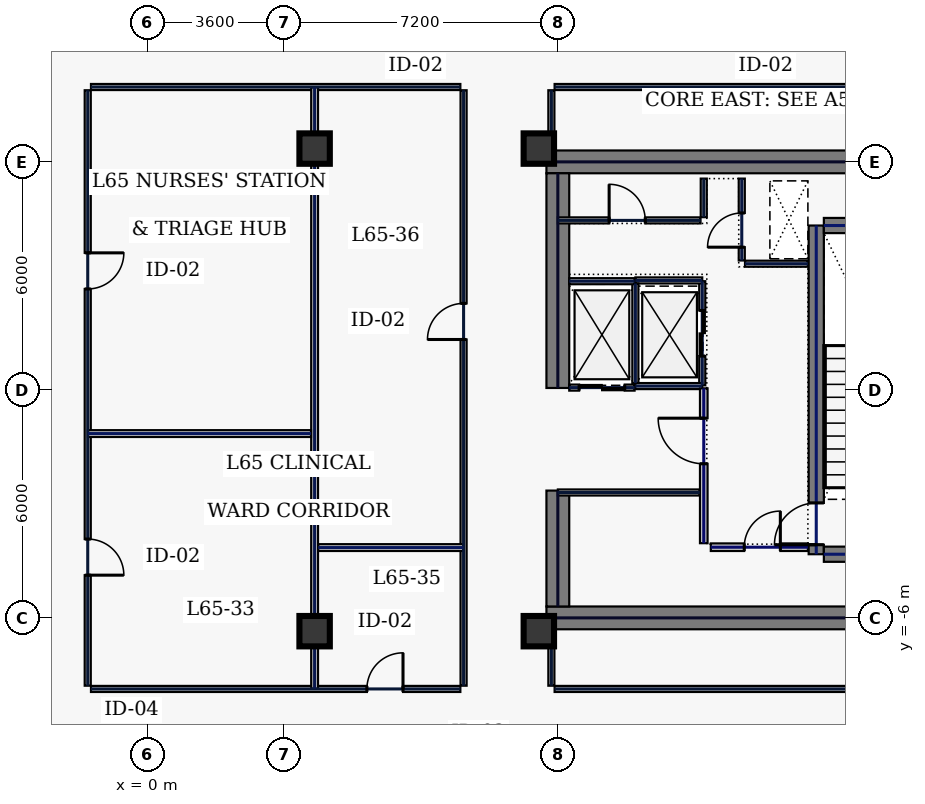
"""IFC4 building model, lengths in metres.
Left out: names, types, materials, properties, quantities, classifications, styles, units other than length and angle.
Written with IfcOpenShell. Run it as: python <this file> out.ifc"""

import sys

from ifc_helpers import new_model, si_unit, direction, frame, frame_2d, origin, origin_2d, place, context, subcontext, project, spatial, rectangle, hollow_rectangle, extrude, element, fill, save


model = new_model("IFC4")
c1 = context("Model", 3, precision=1e-05, world=origin(), true_north=direction((0.0, 1.0)))
c2 = subcontext(c1, "Body", "Model", "MODEL_VIEW")
j1 = project(units=[si_unit("LENGTHUNIT", "METRE"), si_unit("PLANEANGLEUNIT", "RADIAN")], contexts=[c1])
p1 = place(None, origin())
s1 = spatial("IfcSite", under=j1, at=p1, CompositionType="ELEMENT")
p2 = place(p1, origin())
s2 = spatial("IfcBuilding", under=s1, at=p2, CompositionType="ELEMENT")
p3 = place(p2, frame((0.0, 0.0, 281.0)))
s3 = spatial("IfcBuildingStorey", under=s2, at=p3, CompositionType="ELEMENT", Elevation=281.0)
for number, where, z_axis, x_axis in (
    (1, (10.5, 6.0, 0.0), (0.0, 0.0, 1.0), (1.0, 0.0, 0.0)),
    (2, (10.5, -6.0, 0.0), (0.0, 0.0, 1.0), (1.0, 0.0, 0.0)),
):
    element("IfcWall", number, at=place(p3, frame(where, z_axis=z_axis, x_axis=x_axis)), inside=s3, PredefinedType="SHEAR", context=c2, shape_type="SweptSolid", body=[
        extrude(rectangle(XDim=11.5, YDim=0.6, at=frame_2d((5.75, 0.0))), origin(), (0.0, 0.0, 1.0), 3.74),
    ])
p4 = place(p3, frame((10.8, -5.7, 0.0), z_axis=(0.0, 0.0, 1.0), x_axis=(0.0, 1.0, 0.0)))
e3 = element("IfcWall", 3, at=p4, inside=s3, PredefinedType="SHEAR", context=c2, shape_type="SweptSolid", body=[
    extrude(rectangle(XDim=3.05, YDim=0.6, at=frame_2d((1.525, 0.0))), origin(), (0.0, 0.0, 1.0), 3.74),
])
p5 = place(p3, frame((10.8, 0.05, 0.0), z_axis=(0.0, 0.0, 1.0), x_axis=(0.0, 1.0, 0.0)))
e4 = element("IfcWall", 4, at=p5, inside=s3, PredefinedType="SHEAR", context=c2, shape_type="SweptSolid", body=[
    extrude(rectangle(XDim=5.65, YDim=0.6, at=frame_2d((2.825, 0.0))), origin(), (0.0, 0.0, 1.0), 3.74),
])
p6 = place(p3, frame((17.6, -4.325, 0.0), z_axis=(0.0, 0.0, 1.0), x_axis=(0.0, 1.0, 0.0)))
e5 = element("IfcWall", 5, at=p6, inside=s3, PredefinedType="SHEAR", context=c2, shape_type="SweptSolid", body=[
    extrude(rectangle(XDim=8.65, YDim=0.4, at=frame_2d((4.325, 0.0))), origin(), (0.0, 0.0, 1.0), 3.74),
])
p7 = place(p6, frame((0.25, 0.0, 0.0)))
e6 = element("IfcOpeningElement", 6, at=p7, cuts=e5, PredefinedType="OPENING", context=c2, shape_type="SweptSolid", body=[
    extrude(rectangle(XDim=1.1, YDim=2.2, at=frame_2d((0.55, 1.1))), frame((0.0, 0.21, 0.0), z_axis=(0.0, -1.0, 0.0), x_axis=(1.0, 0.0, 0.0)), (0.0, 0.0, 1.0), 0.42),
])
for number, where, z_axis, x_axis in (
    (7, (17.8, -4.325, 0.0), (0.0, 0.0, 1.0), (1.0, 0.0, 0.0)),
    (8, (17.8, 4.325, 0.0), (0.0, 0.0, 1.0), (1.0, 0.0, 0.0)),
):
    element("IfcWall", number, at=place(p3, frame(where, z_axis=z_axis, x_axis=x_axis)), inside=s3, PredefinedType="SHEAR", context=c2, shape_type="SweptSolid", body=[
        extrude(rectangle(XDim=3.4, YDim=0.4, at=frame_2d((1.7, 0.0))), origin(), (0.0, 0.0, 1.0), 3.74),
    ])
for number, where, z_axis, x_axis in (
    (9, (10.3, -6.35, 0.0), (0.0, 0.0, 1.0), (1.0, 0.0, 0.0)),
    (10, (10.3, 6.35, 0.0), (0.0, 0.0, 1.0), (1.0, 0.0, 0.0)),
    (11, (4.4, -6.35, 0.0), (0.0, 0.0, 1.0), (1.0, 0.0, 0.0)),
    (12, (4.4, 6.35, 0.0), (0.0, 0.0, 1.0), (1.0, 0.0, 0.0)),
):
    element("IfcColumn", number, at=place(p3, frame(where, z_axis=z_axis, x_axis=x_axis)), inside=s3, PredefinedType="COLUMN", context=c2, shape_type="SweptSolid", body=[
        extrude(hollow_rectangle(XDim=0.8, YDim=0.8, WallThickness=0.036, at=origin_2d()), origin(), (0.0, 0.0, 1.0), 3.74),
    ])
p8 = place(p3, frame((14.6, 0.12, 0.0), z_axis=(0.0, 0.0, 1.0), x_axis=(0.0, 1.0, 0.0)))
e13 = element("IfcWall", 13, at=p8, inside=s3, PredefinedType="PARTITIONING", context=c2, shape_type="SweptSolid", body=[
    extrude(rectangle(XDim=2.74, YDim=0.16, at=frame_2d((1.37, 0.0))), origin(), (0.0, 0.0, 1.0), 3.74),
])
p9 = place(p8, frame((0.77, 0.0, 0.0)))
e14 = element("IfcOpeningElement", 14, at=p9, cuts=e13, PredefinedType="OPENING", context=c2, shape_type="SweptSolid", body=[
    extrude(rectangle(XDim=1.2, YDim=2.2, at=frame_2d((0.6, 1.1))), frame((0.0, 0.09, 0.0), z_axis=(0.0, -1.0, 0.0), x_axis=(1.0, 0.0, 0.0)), (0.0, 0.0, 1.0), 0.18),
])
for number, where, z_axis, x_axis in (
    (15, (12.84, 0.1, 0.0), (0.0, 0.0, 1.0), (1.0, 0.0, 0.0)),
    (16, (12.84, 2.88, 0.0), (0.0, 0.0, 1.0), (1.0, 0.0, 0.0)),
):
    element("IfcWall", number, at=place(p3, frame(where, z_axis=z_axis, x_axis=x_axis)), inside=s3, PredefinedType="PARTITIONING", context=c2, shape_type="SweptSolid", body=[
        extrude(rectangle(XDim=1.76, YDim=0.16, at=frame_2d((0.88, 0.0))), origin(), (0.0, 0.0, 1.0), 3.74),
    ])
p10 = place(p3, frame((12.84, 0.18, 0.0), z_axis=(0.0, 0.0, 1.0), x_axis=(0.0, 1.0, 0.0)))
e17 = element("IfcWall", 17, at=p10, inside=s3, PredefinedType="PARTITIONING", context=c2, shape_type="SweptSolid", body=[
    extrude(rectangle(XDim=2.62, YDim=0.16, at=frame_2d((1.31, 0.0))), origin(), (0.0, 0.0, 1.0), 3.74),
])
p11 = place(p3, frame((11.1, 0.06, 0.0), z_axis=(0.0, 0.0, 1.0), x_axis=(1.0, 0.0, 0.0)))
e18 = element("IfcWall", 18, at=p11, inside=s3, PredefinedType="PARTITIONING", context=c2, shape_type="SweptSolid", body=[
    extrude(rectangle(XDim=1.72, YDim=0.16, at=frame_2d((0.86, 0.0))), origin(), (0.0, 0.0, 1.0), 3.74),
])
p12 = place(p11, frame((0.26, 0.0, 0.0)))
e19 = element("IfcOpeningElement", 19, at=p12, cuts=e18, PredefinedType="OPENING", context=c2, shape_type="SweptSolid", body=[
    extrude(rectangle(XDim=1.2, YDim=2.2, at=frame_2d((0.6, 1.1))), frame((0.0, 0.09, 0.0), z_axis=(0.0, -1.0, 0.0), x_axis=(1.0, 0.0, 0.0)), (0.0, 0.0, 1.0), 0.18),
])
p13 = place(p3, frame((11.1, 2.86, 0.0), z_axis=(0.0, 0.0, 1.0), x_axis=(1.0, 0.0, 0.0)))
e20 = element("IfcWall", 20, at=p13, inside=s3, PredefinedType="PARTITIONING", context=c2, shape_type="SweptSolid", body=[
    extrude(rectangle(XDim=1.72, YDim=0.16, at=frame_2d((0.86, 0.0))), origin(), (0.0, 0.0, 1.0), 3.74),
])
p14 = place(p3, frame((15.64, 3.405, 0.0), z_axis=(0.0, 0.0, 1.0), x_axis=(0.0, 1.0, 0.0)))
e21 = element("IfcWall", 21, at=p14, inside=s3, PredefinedType="PARTITIONING", context=c2, shape_type="SweptSolid", body=[
    extrude(rectangle(XDim=2.155, YDim=0.16, at=frame_2d((1.078, 0.0))), origin(), (0.0, 0.0, 1.0), 3.74),
])
p15 = place(p14, frame((0.35, 0.0, 0.0)))
e22 = element("IfcOpeningElement", 22, at=p15, cuts=e21, PredefinedType="OPENING", context=c2, shape_type="SweptSolid", body=[
    extrude(rectangle(XDim=0.9, YDim=2.2, at=frame_2d((0.45, 1.1))), frame((0.0, 0.09, 0.0), z_axis=(0.0, -1.0, 0.0), x_axis=(1.0, 0.0, 0.0)), (0.0, 0.0, 1.0), 0.18),
])
p16 = place(p3, frame((15.725, 3.32, 0.0), z_axis=(0.0, 0.0, 1.0), x_axis=(1.0, 0.0, 0.0)))
e23 = element("IfcWall", 23, at=p16, inside=s3, PredefinedType="PARTITIONING", context=c2, shape_type="SweptSolid", body=[
    extrude(rectangle(XDim=1.655, YDim=0.16, at=frame_2d((0.827, 0.0))), origin(), (0.0, 0.0, 1.0), 3.74),
])
p17 = place(p3, frame((14.825, -4.14, 0.0), z_axis=(0.0, 0.0, 1.0), x_axis=(1.0, 0.0, 0.0)))
e24 = element("IfcWall", 24, at=p17, inside=s3, PredefinedType="SOLIDWALL", context=c2, shape_type="SweptSolid", body=[
    extrude(rectangle(XDim=2.555, YDim=0.2, at=frame_2d((1.277, 0.0))), origin(), (0.0, 0.0, 1.0), 3.74),
])
p18 = place(p17, frame((0.88, 0.0, 0.0)))
e25 = element("IfcOpeningElement", 25, at=p18, cuts=e24, PredefinedType="OPENING", context=c2, shape_type="SweptSolid", body=[
    extrude(rectangle(XDim=0.95, YDim=2.2, at=frame_2d((0.475, 1.1))), frame((0.0, 0.11, 0.0), z_axis=(0.0, -1.0, 0.0), x_axis=(1.0, 0.0, 0.0)), (0.0, 0.0, 1.0), 0.22),
])
p19 = place(p3, frame((10.8, -2.7, 0.0), z_axis=(0.0, 0.0, 1.0), x_axis=(1.0, 0.0, 0.0)))
e26 = element("IfcWall", 26, at=p19, inside=s3, PredefinedType="PARTITIONING", context=c2, shape_type="SweptSolid", body=[
    extrude(rectangle(XDim=3.735, YDim=0.16, at=frame_2d((1.867, 0.0))), origin(), (0.0, 0.0, 1.0), 3.74),
])
p20 = place(p3, frame((10.8, 4.46, 0.0), z_axis=(0.0, 0.0, 1.0), x_axis=(1.0, 0.0, 0.0)))
e27 = element("IfcWall", 27, at=p20, inside=s3, PredefinedType="PARTITIONING", context=c2, shape_type="SweptSolid", body=[
    extrude(rectangle(XDim=3.755, YDim=0.16, at=frame_2d((1.877, 0.0))), origin(), (0.0, 0.0, 1.0), 3.74),
])
p21 = place(p20, frame((1.35, 0.0, 0.0)))
e28 = element("IfcOpeningElement", 28, at=p21, cuts=e27, PredefinedType="OPENING", context=c2, shape_type="SweptSolid", body=[
    extrude(rectangle(XDim=0.95, YDim=2.2, at=frame_2d((0.475, 1.1))), frame((0.0, 0.09, 0.0), z_axis=(0.0, -1.0, 0.0), x_axis=(1.0, 0.0, 0.0)), (0.0, 0.0, 1.0), 0.18),
])
p22 = place(p3, frame((14.64, 4.545, 0.0), z_axis=(0.0, 0.0, 1.0), x_axis=(0.0, 1.0, 0.0)))
e29 = element("IfcWall", 29, at=p22, inside=s3, PredefinedType="PARTITIONING", context=c2, shape_type="SweptSolid", body=[
    extrude(rectangle(XDim=1.015, YDim=0.16, at=frame_2d((0.508, 0.0))), origin(), (0.0, 0.0, 1.0), 3.74),
])
p23 = place(p3, frame((14.64, -4.035, 0.0), z_axis=(0.0, 0.0, 1.0), x_axis=(0.0, 1.0, 0.0)))
e30 = element("IfcWall", 30, at=p23, inside=s3, PredefinedType="SOLIDWALL", context=c2, shape_type="SweptSolid", body=[
    extrude(rectangle(XDim=4.075, YDim=0.2, at=frame_2d((2.038, 0.0))), origin(), (0.0, 0.0, 1.0), 3.74),
])
p24 = place(p23, frame((2.09, 0.0, 0.0)))
e31 = element("IfcOpeningElement", 31, at=p24, cuts=e30, PredefinedType="OPENING", context=c2, shape_type="SweptSolid", body=[
    extrude(rectangle(XDim=1.2, YDim=2.2, at=frame_2d((0.6, 1.1))), frame((0.0, 0.11, 0.0), z_axis=(0.0, -1.0, 0.0), x_axis=(1.0, 0.0, 0.0)), (0.0, 0.0, 1.0), 0.22),
])
p25 = place(p3, frame((21.915, 7.97, 0.0), z_axis=(0.0, 0.0, 1.0), x_axis=(-1.0, 0.0, 0.0)))
e32 = element("IfcWall", 32, at=p25, inside=s3, PredefinedType="PARTITIONING", context=c2, shape_type="SweptSolid", body=[
    extrude(rectangle(XDim=11.2, YDim=0.16, at=frame_2d((5.6, 0.0))), origin(), (0.0, 0.0, 1.0), 3.74),
])
p26 = place(p3, frame((10.63, 7.885, 0.0), z_axis=(0.0, 0.0, 1.0), x_axis=(0.0, -1.0, 0.0)))
e33 = element("IfcWall", 33, at=p26, inside=s3, PredefinedType="PARTITIONING", context=c2, shape_type="SweptSolid", body=[
    extrude(rectangle(XDim=1.465, YDim=0.16, at=frame_2d((0.732, 0.0))), origin(), (0.0, 0.0, 1.0), 3.74),
])
p27 = place(p3, frame((10.63, -6.42, 0.0), z_axis=(0.0, 0.0, 1.0), x_axis=(0.0, -1.0, 0.0)))
e34 = element("IfcWall", 34, at=p27, inside=s3, PredefinedType="PARTITIONING", context=c2, shape_type="SweptSolid", body=[
    extrude(rectangle(XDim=1.365, YDim=0.16, at=frame_2d((0.683, 0.0))), origin(), (0.0, 0.0, 1.0), 3.74),
])
p28 = place(p3, frame((10.715, -7.87, 0.0), z_axis=(0.0, 0.0, 1.0), x_axis=(1.0, 0.0, 0.0)))
e35 = element("IfcWall", 35, at=p28, inside=s3, PredefinedType="PARTITIONING", context=c2, shape_type="SweptSolid", body=[
    extrude(rectangle(XDim=11.2, YDim=0.16, at=frame_2d((5.6, 0.0))), origin(), (0.0, 0.0, 1.0), 3.74),
])
p29 = place(p3, frame((8.235, 7.97, 0.0), z_axis=(0.0, 0.0, 1.0), x_axis=(-1.0, 0.0, 0.0)))
e36 = element("IfcWall", 36, at=p29, inside=s3, PredefinedType="PARTITIONING", context=c2, shape_type="SweptSolid", body=[
    extrude(rectangle(XDim=9.72, YDim=0.16, at=frame_2d((4.86, 0.0))), origin(), (0.0, 0.0, 1.0), 3.74),
])
p30 = place(p3, frame((-1.57, 7.885, 0.0), z_axis=(0.0, 0.0, 1.0), x_axis=(0.0, -1.0, 0.0)))
e37 = element("IfcWall", 37, at=p30, inside=s3, PredefinedType="PARTITIONING", context=c2, shape_type="SweptSolid", body=[
    extrude(rectangle(XDim=15.67, YDim=0.16, at=frame_2d((7.835, 0.0))), origin(), (0.0, 0.0, 1.0), 3.74),
])
p31 = place(p30, frame((11.811, 0.0, 0.0)))
e38 = element("IfcOpeningElement", 38, at=p31, cuts=e37, PredefinedType="OPENING", context=c2, shape_type="SweptSolid", body=[
    extrude(rectangle(XDim=0.95, YDim=2.2, at=frame_2d((0.475, 1.1))), frame((0.0, 0.09, 0.0), z_axis=(0.0, -1.0, 0.0), x_axis=(1.0, 0.0, 0.0)), (0.0, 0.0, 1.0), 0.18),
])
p32 = place(p30, frame((4.279, 0.0, 0.0)))
e39 = element("IfcOpeningElement", 39, at=p32, cuts=e37, PredefinedType="OPENING", context=c2, shape_type="SweptSolid", body=[
    extrude(rectangle(XDim=0.95, YDim=2.2, at=frame_2d((0.475, 1.1))), frame((0.0, 0.09, 0.0), z_axis=(0.0, -1.0, 0.0), x_axis=(1.0, 0.0, 0.0)), (0.0, 0.0, 1.0), 0.18),
])
p33 = place(p3, frame((-1.485, -7.87, 0.0), z_axis=(0.0, 0.0, 1.0), x_axis=(1.0, 0.0, 0.0)))
e40 = element("IfcWall", 40, at=p33, inside=s3, PredefinedType="PARTITIONING", context=c2, shape_type="SweptSolid", body=[
    extrude(rectangle(XDim=9.72, YDim=0.16, at=frame_2d((4.86, 0.0))), origin(), (0.0, 0.0, 1.0), 3.74),
])
p34 = place(p33, frame((7.261, 0.0, 0.0)))
e41 = element("IfcOpeningElement", 41, at=p34, cuts=e40, PredefinedType="OPENING", context=c2, shape_type="SweptSolid", body=[
    extrude(rectangle(XDim=0.95, YDim=2.2, at=frame_2d((0.475, 1.1))), frame((0.0, 0.09, 0.0), z_axis=(0.0, -1.0, 0.0), x_axis=(1.0, 0.0, 0.0)), (0.0, 0.0, 1.0), 0.18),
])
p35 = place(p3, frame((8.32, -7.785, 0.0), z_axis=(0.0, 0.0, 1.0), x_axis=(0.0, 1.0, 0.0)))
e42 = element("IfcWall", 42, at=p35, inside=s3, PredefinedType="PARTITIONING", context=c2, shape_type="SweptSolid", body=[
    extrude(rectangle(XDim=15.67, YDim=0.16, at=frame_2d((7.835, 0.0))), origin(), (0.0, 0.0, 1.0), 3.74),
])
p36 = place(p35, frame((9.111, 0.0, 0.0)))
e43 = element("IfcOpeningElement", 43, at=p36, cuts=e42, PredefinedType="OPENING", context=c2, shape_type="SweptSolid", body=[
    extrude(rectangle(XDim=0.95, YDim=2.2, at=frame_2d((0.475, 1.1))), frame((0.0, 0.09, 0.0), z_axis=(0.0, -1.0, 0.0), x_axis=(1.0, 0.0, 0.0)), (0.0, 0.0, 1.0), 0.18),
])
p37 = place(p3, frame((4.4, -7.865, 0.0), z_axis=(0.0, 0.0, 1.0), x_axis=(0.0, 1.0, 0.0)))
e44 = element("IfcWall", 44, at=p37, inside=s3, PredefinedType="PARTITIONING", context=c2, shape_type="SweptSolid", body=[
    extrude(rectangle(XDim=15.83, YDim=0.18, at=frame_2d((7.915, 0.0))), origin(), (0.0, 0.0, 1.0), 2.135),
])
p38 = place(p3, frame((-1.565, -1.15, 0.0), z_axis=(0.0, 0.0, 1.0), x_axis=(1.0, 0.0, 0.0)))
e45 = element("IfcWall", 45, at=p38, inside=s3, PredefinedType="PARTITIONING", context=c2, shape_type="SweptSolid", body=[
    extrude(rectangle(XDim=5.87, YDim=0.18, at=frame_2d((2.935, 0.0))), origin(), (0.0, 0.0, 1.0), 3.74),
])
p39 = place(p3, frame((4.495, -4.15, 0.0), z_axis=(0.0, 0.0, 1.0), x_axis=(1.0, 0.0, 0.0)))
e46 = element("IfcWall", 46, at=p39, inside=s3, PredefinedType="PARTITIONING", context=c2, shape_type="SweptSolid", body=[
    extrude(rectangle(XDim=3.82, YDim=0.18, at=frame_2d((1.91, 0.0))), origin(), (0.0, 0.0, 1.0), 3.74),
])
p40 = place(p7, origin())
e47 = element("IfcDoor", 47, at=p40, inside=s3, OperationType="SINGLE_SWING_LEFT", PredefinedType="DOOR", context=c2, shape_type="SweptSolid", body=[
    extrude(rectangle(XDim=1.1, YDim=2.2, at=frame_2d((0.55, 1.1))), frame((0.0, 0.025, 0.0), z_axis=(0.0, -1.0, 0.0), x_axis=(1.0, 0.0, 0.0)), (0.0, 0.0, 1.0), 0.05),
])
fill(e6, e47)
p41 = place(p9, origin())
e48 = element("IfcDoor", 48, at=p41, inside=s3, OperationType="SLIDING_TO_LEFT", PredefinedType="DOOR", context=c2, shape_type="SweptSolid", body=[
    extrude(rectangle(XDim=1.2, YDim=2.2, at=frame_2d((0.6, 1.1))), frame((0.0, 0.025, 0.0), z_axis=(0.0, -1.0, 0.0), x_axis=(1.0, 0.0, 0.0)), (0.0, 0.0, 1.0), 0.05),
])
fill(e14, e48)
p42 = place(p12, origin())
e49 = element("IfcDoor", 49, at=p42, inside=s3, OperationType="SLIDING_TO_LEFT", PredefinedType="DOOR", context=c2, shape_type="SweptSolid", body=[
    extrude(rectangle(XDim=1.2, YDim=2.2, at=frame_2d((0.6, 1.1))), frame((0.0, 0.025, 0.0), z_axis=(0.0, -1.0, 0.0), x_axis=(1.0, 0.0, 0.0)), (0.0, 0.0, 1.0), 0.05),
])
fill(e19, e49)
p43 = place(p15, origin())
e50 = element("IfcDoor", 50, at=p43, inside=s3, OperationType="SINGLE_SWING_LEFT", PredefinedType="DOOR", context=c2, shape_type="SweptSolid", body=[
    extrude(rectangle(XDim=0.9, YDim=2.2, at=frame_2d((0.45, 1.1))), frame((0.0, 0.025, 0.0), z_axis=(0.0, -1.0, 0.0), x_axis=(1.0, 0.0, 0.0)), (0.0, 0.0, 1.0), 0.05),
])
fill(e22, e50)
p44 = place(p18, origin())
e51 = element("IfcDoor", 51, at=p44, inside=s3, OperationType="SINGLE_SWING_RIGHT", PredefinedType="DOOR", context=c2, shape_type="SweptSolid", body=[
    extrude(rectangle(XDim=0.95, YDim=2.2, at=frame_2d((0.475, 1.1))), frame((0.0, 0.025, 0.0), z_axis=(0.0, -1.0, 0.0), x_axis=(1.0, 0.0, 0.0)), (0.0, 0.0, 1.0), 0.05),
])
fill(e25, e51)
p45 = place(p21, origin())
e52 = element("IfcDoor", 52, at=p45, inside=s3, OperationType="SINGLE_SWING_LEFT", PredefinedType="DOOR", context=c2, shape_type="SweptSolid", body=[
    extrude(rectangle(XDim=0.95, YDim=2.2, at=frame_2d((0.475, 1.1))), frame((0.0, 0.025, 0.0), z_axis=(0.0, -1.0, 0.0), x_axis=(1.0, 0.0, 0.0)), (0.0, 0.0, 1.0), 0.05),
])
fill(e28, e52)
p46 = place(p24, origin())
e53 = element("IfcDoor", 53, at=p46, inside=s3, OperationType="SINGLE_SWING_RIGHT", PredefinedType="DOOR", context=c2, shape_type="SweptSolid", body=[
    extrude(rectangle(XDim=1.2, YDim=2.2, at=frame_2d((0.6, 1.1))), frame((0.0, 0.025, 0.0), z_axis=(0.0, -1.0, 0.0), x_axis=(1.0, 0.0, 0.0)), (0.0, 0.0, 1.0), 0.05),
])
fill(e31, e53)
p47 = place(p31, origin())
e54 = element("IfcDoor", 54, at=p47, inside=s3, OperationType="SINGLE_SWING_RIGHT", PredefinedType="DOOR", context=c2, shape_type="SweptSolid", body=[
    extrude(rectangle(XDim=0.95, YDim=2.2, at=frame_2d((0.475, 1.1))), frame((0.0, 0.025, 0.0), z_axis=(0.0, -1.0, 0.0), x_axis=(1.0, 0.0, 0.0)), (0.0, 0.0, 1.0), 0.05),
])
fill(e38, e54)
p48 = place(p32, origin())
e55 = element("IfcDoor", 55, at=p48, inside=s3, OperationType="SINGLE_SWING_LEFT", PredefinedType="DOOR", context=c2, shape_type="SweptSolid", body=[
    extrude(rectangle(XDim=0.95, YDim=2.2, at=frame_2d((0.475, 1.1))), frame((0.0, 0.025, 0.0), z_axis=(0.0, -1.0, 0.0), x_axis=(1.0, 0.0, 0.0)), (0.0, 0.0, 1.0), 0.05),
])
fill(e39, e55)
p49 = place(p34, origin())
e56 = element("IfcDoor", 56, at=p49, inside=s3, OperationType="SINGLE_SWING_RIGHT", PredefinedType="DOOR", context=c2, shape_type="SweptSolid", body=[
    extrude(rectangle(XDim=0.95, YDim=2.2, at=frame_2d((0.475, 1.1))), frame((0.0, 0.025, 0.0), z_axis=(0.0, -1.0, 0.0), x_axis=(1.0, 0.0, 0.0)), (0.0, 0.0, 1.0), 0.05),
])
fill(e41, e56)
p50 = place(p36, origin())
e57 = element("IfcDoor", 57, at=p50, inside=s3, OperationType="SINGLE_SWING_LEFT", PredefinedType="DOOR", context=c2, shape_type="SweptSolid", body=[
    extrude(rectangle(XDim=0.95, YDim=2.2, at=frame_2d((0.475, 1.1))), frame((0.0, 0.025, 0.0), z_axis=(0.0, -1.0, 0.0), x_axis=(1.0, 0.0, 0.0)), (0.0, 0.0, 1.0), 0.05),
])
fill(e43, e57)
save(model, sys.argv[1])
